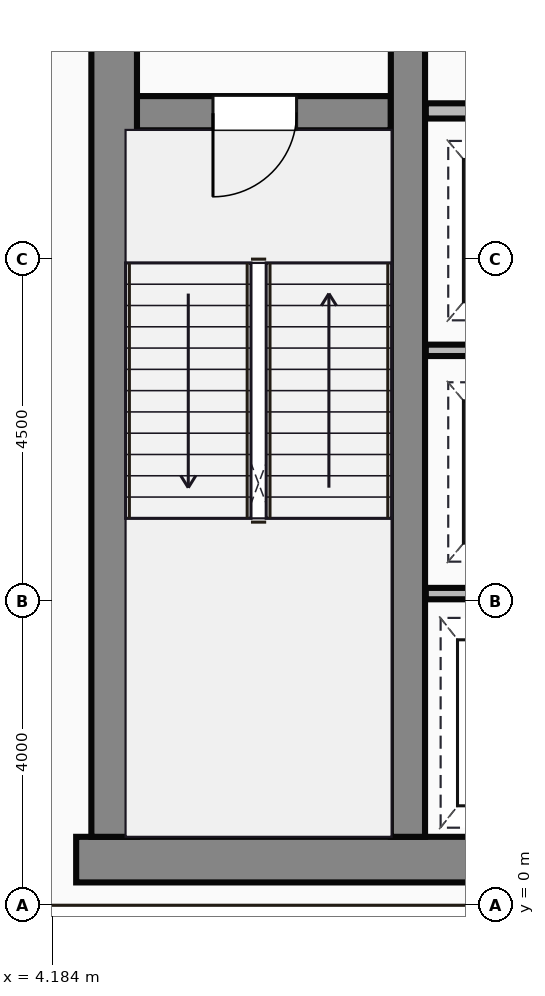
"""IFC4 building model, lengths in metres.
Left out: names, types, materials, properties, quantities, classifications, styles, units other than length and angle.
Written with IfcOpenShell. Run it as: python <this file> out.ifc"""

import sys

from ifc_helpers import new_model, si_unit, direction, frame, frame_2d, origin, place, context, subcontext, project, spatial, rectangle, extrude, source, transform, mapped, element, fill, save


model = new_model("IFC4")
c1 = context("Model", 3, precision=1e-05, world=origin(), true_north=direction((0.0, 1.0)))
c2 = subcontext(c1, "Body", "Model", "MODEL_VIEW")
j1 = project(units=[si_unit("LENGTHUNIT", "METRE"), si_unit("PLANEANGLEUNIT", "RADIAN")], contexts=[c1])
p1 = place(None, origin())
s1 = spatial("IfcSite", under=j1, at=p1, CompositionType="ELEMENT")
p2 = place(p1, origin())
s2 = spatial("IfcBuilding", under=s1, at=p2, CompositionType="ELEMENT")
p3 = place(p2, frame((0.0, 0.0, 236.05)))
s3 = spatial("IfcBuildingStorey", under=s2, at=p3, CompositionType="ELEMENT", Elevation=236.05)
m1 = source(origin(), c2, "Body", "SweptSolid", [
    extrude(rectangle(XDim=29.5, YDim=0.6, at=frame_2d((14.75, 0.0))), origin(), (0.0, 0.0, 1.0), 4.5),
])
p4 = place(p3, frame((4.5, 0.6, 0.0), z_axis=(0.0, 0.0, 1.0), x_axis=(1.0, 0.0, 0.0)))
e1 = element("IfcWall", 1, at=p4, inside=s3, PredefinedType="SHEAR", context=c2, shape_type="MappedRepresentation", body=[
    mapped(m1, transform((0.0, 0.0, 0.0))),
])
m2 = source(origin(), c2, "Body", "SweptSolid", [
    extrude(rectangle(XDim=13.1, YDim=0.6, at=frame_2d((6.55, 0.0))), origin(), (0.0, 0.0, 1.0), 4.5),
])
p5 = place(p3, frame((5.0, 0.9, 0.0), z_axis=(0.0, 0.0, 1.0), x_axis=(0.0, 1.0, 0.0)))
e2 = element("IfcWall", 2, at=p5, inside=s3, PredefinedType="SHEAR", context=c2, shape_type="MappedRepresentation", body=[
    mapped(m2, transform((0.0, 0.0, 0.0))),
])
m3 = source(origin(), c2, "Body", "SweptSolid", [
    extrude(rectangle(XDim=12.5, YDim=0.45, at=frame_2d((6.25, 0.0))), origin(), (0.0, 0.0, 1.0), 4.5),
])
p6 = place(p3, frame((8.865, 0.9, 0.0), z_axis=(0.0, 0.0, 1.0), x_axis=(0.0, 1.0, 0.0)))
e3 = element("IfcWall", 3, at=p6, inside=s3, PredefinedType="SHEAR", context=c2, shape_type="MappedRepresentation", body=[
    mapped(m3, transform((0.0, 0.0, 0.0))),
])
m4 = source(origin(), c2, "Body", "SweptSolid", [
    extrude(rectangle(XDim=3.39, YDim=0.45, at=frame_2d((1.695, 0.0))), origin(), (0.0, 0.0, 1.0), 4.5),
])
p7 = place(p3, frame((5.25, 10.42, 0.0), z_axis=(0.0, 0.0, 1.0), x_axis=(1.0, 0.0, 0.0)))
e4 = element("IfcWall", 4, at=p7, inside=s3, PredefinedType="SHEAR", context=c2, shape_type="MappedRepresentation", body=[
    mapped(m4, transform((0.0, 0.0, 0.0))),
])
p8 = place(p7, frame((1.05, 0.0, 0.0)))
e5 = element("IfcOpeningElement", 5, at=p8, cuts=e4, PredefinedType="OPENING", context=c2, shape_type="SweptSolid", body=[
    extrude(rectangle(XDim=1.1, YDim=2.15, at=frame_2d((0.55, 1.075))), frame((0.0, 0.235, 0.0), z_axis=(0.0, -1.0, 0.0), x_axis=(1.0, 0.0, 0.0)), (0.0, 0.0, 1.0), 0.47),
])
m5 = source(origin(), c2, "Body", "SweptSolid", [
    extrude(rectangle(XDim=2.35, YDim=0.2, at=frame_2d((1.175, 0.0))), origin(), (0.0, 0.0, 1.0), 4.25),
])
p9 = place(p3, frame((9.1, 10.45, 0.0), z_axis=(0.0, 0.0, 1.0), x_axis=(1.0, 0.0, 0.0)))
e6 = element("IfcWall", 6, at=p9, inside=s3, PredefinedType="PARTITIONING", context=c2, shape_type="MappedRepresentation", body=[
    mapped(m5, transform((0.0, 0.0, 0.0))),
])
p10 = place(p9, frame((0.55, 0.0, 0.0)))
e7 = element("IfcOpeningElement", 7, at=p10, cuts=e6, PredefinedType="OPENING", context=c2, shape_type="SweptSolid", body=[
    extrude(rectangle(XDim=1.1, YDim=2.15, at=frame_2d((0.55, 1.075))), frame((0.0, 0.11, 0.0), z_axis=(0.0, -1.0, 0.0), x_axis=(1.0, 0.0, 0.0)), (0.0, 0.0, 1.0), 0.22),
])
m6 = source(origin(), c2, "Body", "SweptSolid", [
    extrude(rectangle(XDim=2.4, YDim=0.15, at=frame_2d((1.2, 0.0))), origin(), (0.0, 0.0, 1.0), 4.25),
])
for number, where, z_axis, x_axis in (
    (8, (9.1, 4.1, 0.0), (0.0, 0.0, 1.0), (1.0, 0.0, 0.0)),
    (9, (9.1, 7.3, 0.0), (0.0, 0.0, 1.0), (1.0, 0.0, 0.0)),
):
    element("IfcWall", number, at=place(p3, frame(where, z_axis=z_axis, x_axis=x_axis)), inside=s3, PredefinedType="PARTITIONING", context=c2, shape_type="MappedRepresentation", body=[
        mapped(m6, transform((0.0, 0.0, 0.0))),
    ])
m7 = source(origin(), c2, "Body", "SweptSolid", [
    extrude(rectangle(XDim=1.1, YDim=2.15, at=frame_2d((0.55, 1.075))), frame((0.0, 0.025, 0.0), z_axis=(0.0, -1.0, 0.0), x_axis=(1.0, 0.0, 0.0)), (0.0, 0.0, 1.0), 0.05),
])
p11 = place(p8, frame((1.1, 0.0, 0.0), z_axis=(0.0, 0.0, 1.0), x_axis=(-1.0, 0.0, 0.0)))
e10 = element("IfcDoor", 10, at=p11, inside=s3, OperationType="SINGLE_SWING_LEFT", PredefinedType="DOOR", context=c2, shape_type="MappedRepresentation", body=[
    mapped(m7, transform((0.0, 0.0, 0.0))),
])
fill(e5, e10)
save(model, sys.argv[1])
